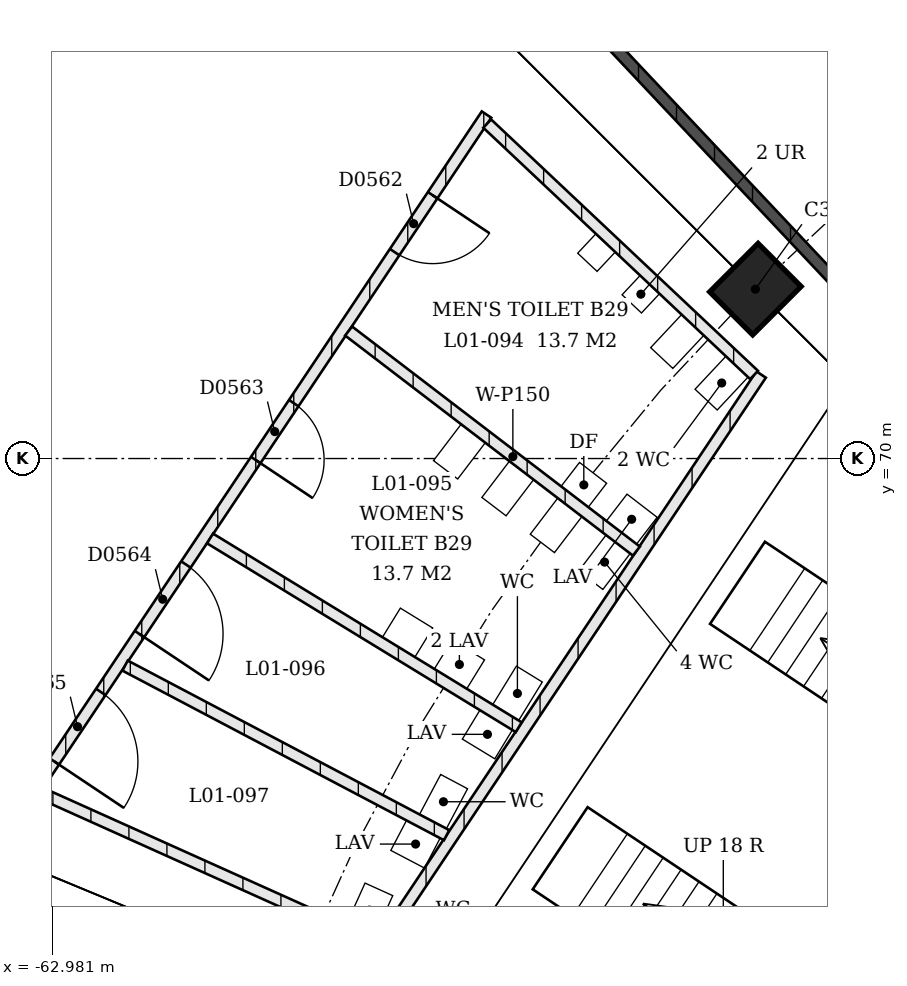
"""IFC4 building model, lengths in metres.
Left out: names, types, materials, properties, quantities, classifications, styles, units other than length and angle.
Written with IfcOpenShell. Run it as: python <this file> out.ifc"""

import sys

from ifc_helpers import new_model, si_unit, direction, frame, frame_2d, origin, origin_2d, place, context, subcontext, project, spatial, rectangle, extrude, element, fill, save


model = new_model("IFC4")
c1 = context("Model", 3, precision=1e-05, world=origin(), true_north=direction((0.0, 1.0)))
c2 = subcontext(c1, "Body", "Model", "MODEL_VIEW")
j1 = project(units=[si_unit("LENGTHUNIT", "METRE"), si_unit("PLANEANGLEUNIT", "RADIAN")], contexts=[c1])
p1 = place(None, origin())
s1 = spatial("IfcSite", under=j1, at=p1, CompositionType="ELEMENT")
p2 = place(p1, origin())
s2 = spatial("IfcBuilding", under=s1, at=p2, CompositionType="ELEMENT")
p3 = place(p2, frame((0.0, 0.0, 4.5)))
s3 = spatial("IfcBuildingStorey", under=s2, at=p3, CompositionType="ELEMENT", Elevation=4.5)
p4 = place(p3, frame((-53.728, 72.228, 0.0), z_axis=(0.0, 0.0, 1.0), x_axis=(-0.707106781187, -0.707106781187, 0.0)))
e1 = element("IfcColumn", 1, at=p4, inside=s3, PredefinedType="COLUMN", context=c2, shape_type="SweptSolid", body=[
    extrude(rectangle(XDim=0.9, YDim=0.8, at=origin_2d()), origin(), (0.0, 0.0, 1.0), 4.5),
])
p5 = place(p3, frame((-59.304, 62.408, 0.0), z_axis=(0.0, 0.0, 1.0), x_axis=(-0.931152553876, 0.364629841634, 0.0)))
e2 = element("IfcWall", 2, at=p5, inside=s3, PredefinedType="SOLIDWALL", context=c2, shape_type="SweptSolid", body=[
    extrude(rectangle(XDim=4.832, YDim=0.15, at=frame_2d((2.416, 0.0))), origin(), (0.0, 0.0, 1.0), 3.0),
])
p6 = place(p3, frame((-53.653, 71.105, 0.0), z_axis=(0.0, 0.0, 1.0), x_axis=(-0.555566497886, -0.831472108027, 0.0)))
e3 = element("IfcWall", 3, at=p6, inside=s3, PredefinedType="PARTITIONING", context=c2, shape_type="SweptSolid", body=[
    extrude(rectangle(XDim=9.102, YDim=0.15, at=frame_2d((4.551, 0.0))), origin(), (0.0, 0.0, 1.0), 3.0),
])
p7 = place(p3, frame((-57.266, 74.525, 0.0), z_axis=(0.0, 0.0, 1.0), x_axis=(-0.555562662276, -0.831474670862, 0.0)))
e4 = element("IfcWall", 4, at=p7, inside=s3, PredefinedType="PARTITIONING", context=c2, shape_type="SweptSolid", body=[
    extrude(rectangle(XDim=10.775, YDim=0.15, at=frame_2d((5.387, 0.0))), origin(), (0.0, 0.0, 1.0), 3.0),
])
p8 = place(p7, frame((1.276, 0.0, 0.0)))
e5 = element("IfcOpeningElement", 5, at=p8, cuts=e4, PredefinedType="OPENING", context=c2, shape_type="SweptSolid", body=[
    extrude(rectangle(XDim=0.9, YDim=2.1, at=frame_2d((0.45, 1.05))), frame((0.0, 0.075, 0.0), z_axis=(0.0, -1.0, 0.0), x_axis=(1.0, 0.0, 0.0)), (0.0, 0.0, 1.0), 0.15),
])
p9 = place(p7, frame((4.566, 0.0, 0.0)))
e6 = element("IfcOpeningElement", 6, at=p9, cuts=e4, PredefinedType="OPENING", context=c2, shape_type="SweptSolid", body=[
    extrude(rectangle(XDim=0.9, YDim=2.1, at=frame_2d((0.45, 1.05))), frame((0.0, 0.075, 0.0), z_axis=(0.0, -1.0, 0.0), x_axis=(1.0, 0.0, 0.0)), (0.0, 0.0, 1.0), 0.15),
])
p10 = place(p7, frame((7.119, 0.0, 0.0)))
e7 = element("IfcOpeningElement", 7, at=p10, cuts=e4, PredefinedType="OPENING", context=c2, shape_type="SweptSolid", body=[
    extrude(rectangle(XDim=1.1, YDim=2.1, at=frame_2d((0.55, 1.05))), frame((0.0, 0.075, 0.0), z_axis=(0.0, -1.0, 0.0), x_axis=(1.0, 0.0, 0.0)), (0.0, 0.0, 1.0), 0.15),
])
p11 = place(p7, frame((9.135, 0.0, 0.0)))
e8 = element("IfcOpeningElement", 8, at=p11, cuts=e4, PredefinedType="OPENING", context=c2, shape_type="SweptSolid", body=[
    extrude(rectangle(XDim=1.1, YDim=2.1, at=frame_2d((0.55, 1.05))), frame((0.0, 0.075, 0.0), z_axis=(0.0, -1.0, 0.0), x_axis=(1.0, 0.0, 0.0)), (0.0, 0.0, 1.0), 0.15),
])
p12 = place(p3, frame((-53.746, 71.099, 0.0), z_axis=(0.0, 0.0, 1.0), x_axis=(-0.727898273696, 0.685685134118, 0.0)))
e9 = element("IfcWall", 9, at=p12, inside=s3, PredefinedType="PARTITIONING", context=c2, shape_type="SweptSolid", body=[
    extrude(rectangle(XDim=4.823, YDim=0.15, at=frame_2d((2.412, 0.0))), origin(), (0.0, 0.0, 1.0), 3.0),
])
p13 = place(p3, frame((-55.294, 68.782, 0.0), z_axis=(0.0, 0.0, 1.0), x_axis=(-0.794378186515, 0.607423490482, 0.0)))
e10 = element("IfcWall", 10, at=p13, inside=s3, PredefinedType="PARTITIONING", context=c2, shape_type="SweptSolid", body=[
    extrude(rectangle(XDim=4.766, YDim=0.15, at=frame_2d((2.383, 0.0))), origin(), (0.0, 0.0, 1.0), 3.0),
])
p14 = place(p3, frame((-56.842, 66.465, 0.0), z_axis=(0.0, 0.0, 1.0), x_axis=(-0.853168994556, 0.521634610364, 0.0)))
e11 = element("IfcWall", 11, at=p14, inside=s3, PredefinedType="PARTITIONING", context=c2, shape_type="SweptSolid", body=[
    extrude(rectangle(XDim=4.761, YDim=0.15, at=frame_2d((2.38, 0.0))), origin(), (0.0, 0.0, 1.0), 3.0),
])
p15 = place(p3, frame((-57.791, 65.045, 0.0), z_axis=(0.0, 0.0, 1.0), x_axis=(-0.884560293024, 0.466425865498, 0.0)))
e12 = element("IfcWall", 12, at=p15, inside=s3, PredefinedType="PARTITIONING", context=c2, shape_type="SweptSolid", body=[
    extrude(rectangle(XDim=4.782, YDim=0.15, at=frame_2d((2.391, 0.0))), origin(), (0.0, 0.0, 1.0), 3.0),
])
p16 = place(p3, frame((-58.74, 63.625, 0.0), z_axis=(0.0, 0.0, 1.0), x_axis=(-0.912037017215, 0.410107887306, 0.0)))
e13 = element("IfcWall", 13, at=p16, inside=s3, PredefinedType="PARTITIONING", context=c2, shape_type="SweptSolid", body=[
    extrude(rectangle(XDim=4.823, YDim=0.15, at=frame_2d((2.412, 0.0))), origin(), (0.0, 0.0, 1.0), 3.0),
])
p17 = place(p3, frame((-52.599, 72.246, 0.0), z_axis=(0.0, 0.0, 1.0), x_axis=(-0.685685134118, 0.727898273696, 0.0)))
e14 = element("IfcWall", 14, at=p17, inside=s3, PredefinedType="SOLIDWALL", context=c2, shape_type="SweptSolid", body=[
    extrude(rectangle(XDim=4.823, YDim=0.15, at=frame_2d((2.412, 0.0))), origin(), (0.0, 0.0, 1.0), 3.0),
])
p18 = place(p8, origin())
e15 = element("IfcDoor", 15, at=p18, inside=s3, OperationType="SINGLE_SWING_RIGHT", PredefinedType="DOOR", context=c2, shape_type="SweptSolid", body=[
    extrude(rectangle(XDim=0.9, YDim=2.1, at=frame_2d((0.45, 1.05))), frame((0.0, 0.025, 0.0), z_axis=(0.0, -1.0, 0.0), x_axis=(1.0, 0.0, 0.0)), (0.0, 0.0, 1.0), 0.05),
])
fill(e5, e15)
p19 = place(p9, origin())
e16 = element("IfcDoor", 16, at=p19, inside=s3, OperationType="SINGLE_SWING_LEFT", PredefinedType="DOOR", context=c2, shape_type="SweptSolid", body=[
    extrude(rectangle(XDim=0.9, YDim=2.1, at=frame_2d((0.45, 1.05))), frame((0.0, 0.025, 0.0), z_axis=(0.0, -1.0, 0.0), x_axis=(1.0, 0.0, 0.0)), (0.0, 0.0, 1.0), 0.05),
])
fill(e6, e16)
p20 = place(p10, origin())
e17 = element("IfcDoor", 17, at=p20, inside=s3, OperationType="SINGLE_SWING_LEFT", PredefinedType="DOOR", context=c2, shape_type="SweptSolid", body=[
    extrude(rectangle(XDim=1.1, YDim=2.1, at=frame_2d((0.55, 1.05))), frame((0.0, 0.025, 0.0), z_axis=(0.0, -1.0, 0.0), x_axis=(1.0, 0.0, 0.0)), (0.0, 0.0, 1.0), 0.05),
])
fill(e7, e17)
p21 = place(p11, origin())
e18 = element("IfcDoor", 18, at=p21, inside=s3, OperationType="SINGLE_SWING_LEFT", PredefinedType="DOOR", context=c2, shape_type="SweptSolid", body=[
    extrude(rectangle(XDim=1.1, YDim=2.1, at=frame_2d((0.55, 1.05))), frame((0.0, 0.025, 0.0), z_axis=(0.0, -1.0, 0.0), x_axis=(1.0, 0.0, 0.0)), (0.0, 0.0, 1.0), 0.05),
])
fill(e8, e18)
save(model, sys.argv[1])
